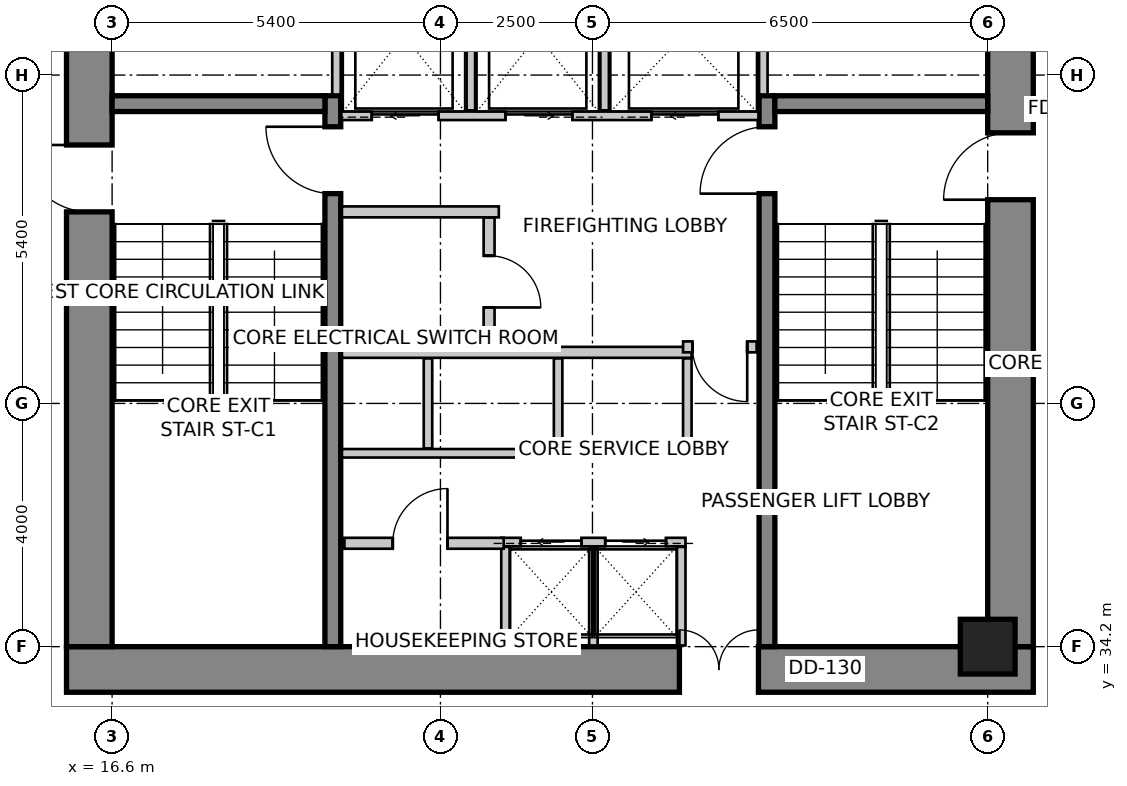
"""IFC4 building model, lengths in metres.
Left out: names, types, materials, properties, quantities, classifications, styles, units other than length and angle.
Written with IfcOpenShell. Run it as: python <this file> out.ifc"""

import sys

from ifc_helpers import new_model, si_unit, direction, frame, frame_2d, origin, origin_2d, place, context, subcontext, project, spatial, rectangle, extrude, source, transform, mapped, element, fill, save


model = new_model("IFC4")
c1 = context("Model", 3, precision=1e-05, world=origin(), true_north=direction((0.0, 1.0)))
c2 = subcontext(c1, "Body", "Model", "MODEL_VIEW")
j1 = project(units=[si_unit("LENGTHUNIT", "METRE"), si_unit("PLANEANGLEUNIT", "RADIAN")], contexts=[c1])
p1 = place(None, origin())
s1 = spatial("IfcSite", under=j1, at=p1, CompositionType="ELEMENT")
p2 = place(p1, origin())
s2 = spatial("IfcBuilding", under=s1, at=p2, CompositionType="ELEMENT")
p3 = place(p2, frame((0.0, 0.0, 117.8)))
s3 = spatial("IfcBuildingStorey", under=s2, at=p3, CompositionType="ELEMENT", Elevation=117.8)
p4 = place(p3, frame((15.85, 33.825, 0.0), z_axis=(0.0, 0.0, 1.0), x_axis=(1.0, 0.0, 0.0)))
e1 = element("IfcWall", 1, at=p4, inside=s3, PredefinedType="SHEAR", context=c2, shape_type="SweptSolid", body=[
    extrude(rectangle(XDim=15.9, YDim=0.75, at=frame_2d((7.95, 0.0))), origin(), (0.0, 0.0, 1.0), 3.6),
])
m1 = source(origin(), c2, "Body", "SweptSolid", [
    extrude(rectangle(XDim=1.3, YDim=2.15, at=frame_2d((0.65, 1.075))), frame((0.0, 0.385, 0.0), z_axis=(0.0, -1.0, 0.0), x_axis=(1.0, 0.0, 0.0)), (0.0, 0.0, 1.0), 0.77),
])
p5 = place(p4, frame((10.08, 0.0, 0.0)))
e2 = element("IfcOpeningElement", 2, at=p5, cuts=e1, PredefinedType="OPENING", context=c2, shape_type="MappedRepresentation", body=[
    mapped(m1, transform((0.0, 0.0, 0.0), scale=1.0)),
])
p6 = place(p3, frame((16.225, 34.2, 0.0), z_axis=(0.0, 0.0, 1.0), x_axis=(0.0, 1.0, 0.0)))
e3 = element("IfcWall", 3, at=p6, inside=s3, PredefinedType="SHEAR", context=c2, shape_type="SweptSolid", body=[
    extrude(rectangle(XDim=11.4, YDim=0.75, at=frame_2d((5.7, 0.0))), origin(), (0.0, 0.0, 1.0), 3.6),
])
m2 = source(origin(), c2, "Body", "SweptSolid", [
    extrude(rectangle(XDim=1.1, YDim=2.15, at=frame_2d((0.55, 1.075))), frame((0.0, 0.385, 0.0), z_axis=(0.0, -1.0, 0.0), x_axis=(1.0, 0.0, 0.0)), (0.0, 0.0, 1.0), 0.77),
])
p7 = place(p6, frame((7.15, 0.0, 0.0)))
e4 = element("IfcOpeningElement", 4, at=p7, cuts=e3, PredefinedType="OPENING", context=c2, shape_type="MappedRepresentation", body=[
    mapped(m2, transform((0.0, 0.0, 0.0), scale=1.0)),
])
p8 = place(p3, frame((31.375, 34.2, 0.0), z_axis=(0.0, 0.0, 1.0), x_axis=(0.0, 1.0, 0.0)))
e5 = element("IfcWall", 5, at=p8, inside=s3, PredefinedType="SHEAR", context=c2, shape_type="SweptSolid", body=[
    extrude(rectangle(XDim=11.4, YDim=0.75, at=frame_2d((5.7, 0.0))), origin(), (0.0, 0.0, 1.0), 3.6),
])
p9 = place(p8, frame((7.35, 0.0, 0.0)))
e6 = element("IfcOpeningElement", 6, at=p9, cuts=e5, PredefinedType="OPENING", context=c2, shape_type="MappedRepresentation", body=[
    mapped(m2, transform((0.0, 0.0, 0.0), scale=1.0)),
])
p10 = place(p3, frame((20.23, 34.2, 0.0), z_axis=(0.0, 0.0, 1.0), x_axis=(0.0, 1.0, 0.0)))
e7 = element("IfcWall", 7, at=p10, inside=s3, PredefinedType="SHEAR", context=c2, shape_type="SweptSolid", body=[
    extrude(rectangle(XDim=9.06, YDim=0.26, at=frame_2d((4.53, 0.0))), origin(), (0.0, 0.0, 1.0), 3.6),
])
m3 = source(origin(), c2, "Body", "SweptSolid", [
    extrude(rectangle(XDim=1.1, YDim=2.15, at=frame_2d((0.55, 1.075))), frame((0.0, 0.14, 0.0), z_axis=(0.0, -1.0, 0.0), x_axis=(1.0, 0.0, 0.0)), (0.0, 0.0, 1.0), 0.28),
])
p11 = place(p10, frame((7.45, 0.0, 0.0)))
e8 = element("IfcOpeningElement", 8, at=p11, cuts=e7, PredefinedType="OPENING", context=c2, shape_type="MappedRepresentation", body=[
    mapped(m3, transform((0.0, 0.0, 0.0), scale=1.0)),
])
p12 = place(p3, frame((27.37, 34.2, 0.0), z_axis=(0.0, 0.0, 1.0), x_axis=(0.0, 1.0, 0.0)))
e9 = element("IfcWall", 9, at=p12, inside=s3, PredefinedType="SHEAR", context=c2, shape_type="SweptSolid", body=[
    extrude(rectangle(XDim=9.06, YDim=0.26, at=frame_2d((4.53, 0.0))), origin(), (0.0, 0.0, 1.0), 3.6),
])
p13 = place(p12, frame((7.45, 0.0, 0.0)))
e10 = element("IfcOpeningElement", 10, at=p13, cuts=e9, PredefinedType="OPENING", context=c2, shape_type="MappedRepresentation", body=[
    mapped(m3, transform((0.0, 0.0, 0.0), scale=1.0)),
])
for number, where, z_axis, x_axis in (
    (11, (16.6, 43.13, 0.0), (0.0, 0.0, 1.0), (1.0, 0.0, 0.0)),
    (12, (27.5, 43.13, 0.0), (0.0, 0.0, 1.0), (1.0, 0.0, 0.0)),
):
    element("IfcWall", number, at=place(p3, frame(where, z_axis=z_axis, x_axis=x_axis)), inside=s3, PredefinedType="SHEAR", context=c2, shape_type="SweptSolid", body=[
        extrude(rectangle(XDim=3.5, YDim=0.26, at=frame_2d((1.75, 0.0))), origin(), (0.0, 0.0, 1.0), 3.6),
    ])
m4 = source(origin(), c2, "Body", "SweptSolid", [
    extrude(rectangle(XDim=0.9, YDim=0.9, at=origin_2d()), origin(), (0.0, 0.0, 1.0), 3.6),
])
p14 = place(p3, frame((31.0, 34.2, 0.0), z_axis=(0.0, 0.0, 1.0), x_axis=(1.0, 0.0, 0.0)))
e13 = element("IfcColumn", 13, at=p14, inside=s3, PredefinedType="COLUMN", context=c2, shape_type="MappedRepresentation", body=[
    mapped(m4, transform((0.0, 0.0, 0.0), scale=1.0)),
])
p15 = place(p3, frame((20.37, 42.93, 0.0), z_axis=(0.0, 0.0, 1.0), x_axis=(1.0, 0.0, 0.0)))
e14 = element("IfcWall", 14, at=p15, inside=s3, PredefinedType="SOLIDWALL", context=c2, shape_type="SweptSolid", body=[
    extrude(rectangle(XDim=6.86, YDim=0.14, at=frame_2d((3.43, 0.0))), origin(), (0.0, 0.0, 1.0), 3.35),
])
m5 = source(origin(), c2, "Body", "SweptSolid", [
    extrude(rectangle(XDim=1.1, YDim=2.15, at=frame_2d((0.55, 1.075))), frame((0.0, 0.08, 0.0), z_axis=(0.0, -1.0, 0.0), x_axis=(1.0, 0.0, 0.0)), (0.0, 0.0, 1.0), 0.16),
])
p16 = place(p15, frame((0.5, 0.0, 0.0)))
e15 = element("IfcOpeningElement", 15, at=p16, cuts=e14, PredefinedType="OPENING", context=c2, shape_type="MappedRepresentation", body=[
    mapped(m5, transform((0.0, 0.0, 0.0), scale=1.0)),
])
p17 = place(p15, frame((2.7, 0.0, 0.0)))
e16 = element("IfcOpeningElement", 16, at=p17, cuts=e14, PredefinedType="OPENING", context=c2, shape_type="MappedRepresentation", body=[
    mapped(m5, transform((0.0, 0.0, 0.0), scale=1.0)),
])
p18 = place(p15, frame((5.1, 0.0, 0.0)))
e17 = element("IfcOpeningElement", 17, at=p18, cuts=e14, PredefinedType="OPENING", context=c2, shape_type="MappedRepresentation", body=[
    mapped(m5, transform((0.0, 0.0, 0.0), scale=1.0)),
])
for number, where, z_axis, x_axis in (
    (18, (20.29, 43.28, 0.0), (0.0, 0.0, 1.0), (0.0, 1.0, 0.0)),
    (19, (27.31, 43.28, 0.0), (0.0, 0.0, 1.0), (0.0, 1.0, 0.0)),
):
    element("IfcWall", number, at=place(p3, frame(where, z_axis=z_axis, x_axis=x_axis)), inside=s3, PredefinedType="SOLIDWALL", context=c2, shape_type="SweptSolid", body=[
        extrude(rectangle(XDim=2.3, YDim=0.14, at=frame_2d((1.15, 0.0))), origin(), (0.0, 0.0, 1.0), 3.35),
    ])
for number, where, z_axis, x_axis in (
    (20, (22.5, 43.02, 0.0), (0.0, 0.0, 1.0), (0.0, 1.0, 0.0)),
    (21, (24.7, 43.02, 0.0), (0.0, 0.0, 1.0), (0.0, 1.0, 0.0)),
):
    element("IfcWall", number, at=place(p3, frame(where, z_axis=z_axis, x_axis=x_axis)), inside=s3, PredefinedType="SOLIDWALL", context=c2, shape_type="SweptSolid", body=[
        extrude(rectangle(XDim=2.56, YDim=0.14, at=frame_2d((1.28, 0.0))), origin(), (0.0, 0.0, 1.0), 3.35),
    ])
p19 = place(p3, frame((23.0, 35.92, 0.0), z_axis=(0.0, 0.0, 1.0), x_axis=(1.0, 0.0, 0.0)))
e22 = element("IfcWall", 22, at=p19, inside=s3, PredefinedType="SOLIDWALL", context=c2, shape_type="SweptSolid", body=[
    extrude(rectangle(XDim=3.03, YDim=0.14, at=frame_2d((1.515, 0.0))), origin(), (0.0, 0.0, 1.0), 3.35),
])
m6 = source(origin(), c2, "Body", "SweptSolid", [
    extrude(rectangle(XDim=1.0, YDim=2.15, at=frame_2d((0.5, 1.075))), frame((0.0, 0.08, 0.0), z_axis=(0.0, -1.0, 0.0), x_axis=(1.0, 0.0, 0.0)), (0.0, 0.0, 1.0), 0.16),
])
p20 = place(p19, frame((0.32, 0.0, 0.0)))
e23 = element("IfcOpeningElement", 23, at=p20, cuts=e22, PredefinedType="OPENING", context=c2, shape_type="MappedRepresentation", body=[
    mapped(m6, transform((0.0, 0.0, 0.0), scale=1.0)),
])
p21 = place(p19, frame((1.71, 0.0, 0.0)))
e24 = element("IfcOpeningElement", 24, at=p21, cuts=e22, PredefinedType="OPENING", context=c2, shape_type="MappedRepresentation", body=[
    mapped(m6, transform((0.0, 0.0, 0.0), scale=1.0)),
])
for number, where, z_axis, x_axis in (
    (25, (25.96, 34.22, 0.0), (0.0, 0.0, 1.0), (0.0, 1.0, 0.0)),
    (26, (23.07, 34.22, 0.0), (0.0, 0.0, 1.0), (0.0, 1.0, 0.0)),
    (27, (24.515, 34.22, 0.0), (0.0, 0.0, 1.0), (0.0, 1.0, 0.0)),
):
    element("IfcWall", number, at=place(p3, frame(where, z_axis=z_axis, x_axis=x_axis)), inside=s3, PredefinedType="SOLIDWALL", context=c2, shape_type="SweptSolid", body=[
        extrude(rectangle(XDim=1.62, YDim=0.14, at=frame_2d((0.81, 0.0))), origin(), (0.0, 0.0, 1.0), 2.642),
    ])
p22 = place(p3, frame((20.38, 37.38, 0.0), z_axis=(0.0, 0.0, 1.0), x_axis=(1.0, 0.0, 0.0)))
e28 = element("IfcWall", 28, at=p22, inside=s3, PredefinedType="SOLIDWALL", context=c2, shape_type="SweptSolid", body=[
    extrude(rectangle(XDim=5.75, YDim=0.14, at=frame_2d((2.875, 0.0))), origin(), (0.0, 0.0, 1.0), 3.35),
])
p23 = place(p3, frame((20.38, 39.04, 0.0), z_axis=(0.0, 0.0, 1.0), x_axis=(1.0, 0.0, 0.0)))
e29 = element("IfcWall", 29, at=p23, inside=s3, PredefinedType="SOLIDWALL", context=c2, shape_type="SweptSolid", body=[
    extrude(rectangle(XDim=5.75, YDim=0.18, at=frame_2d((2.875, 0.0))), origin(), (0.0, 0.0, 1.0), 3.35),
])
for number, where, z_axis, x_axis in (
    (30, (26.06, 37.46, 0.0), (0.0, 0.0, 1.0), (0.0, 1.0, 0.0)),
    (31, (21.795, 37.46, 0.0), (0.0, 0.0, 1.0), (0.0, 1.0, 0.0)),
    (32, (23.935, 37.46, 0.0), (0.0, 0.0, 1.0), (0.0, 1.0, 0.0)),
):
    element("IfcWall", number, at=place(p3, frame(where, z_axis=z_axis, x_axis=x_axis)), inside=s3, PredefinedType="SOLIDWALL", context=c2, shape_type="SweptSolid", body=[
        extrude(rectangle(XDim=1.48, YDim=0.14, at=frame_2d((0.74, 0.0))), origin(), (0.0, 0.0, 1.0), 3.35),
    ])
p24 = place(p3, frame((22.96, 41.35, 0.0), z_axis=(0.0, 0.0, 1.0), x_axis=(-1.0, 0.0, 0.0)))
e33 = element("IfcWall", 33, at=p24, inside=s3, PredefinedType="PARTITIONING", context=c2, shape_type="SweptSolid", body=[
    extrude(rectangle(XDim=2.58, YDim=0.18, at=frame_2d((1.29, 0.0))), origin(), (0.0, 0.0, 1.0), 3.35),
])
p25 = place(p3, frame((22.8, 41.256, 0.0), z_axis=(0.0, 0.0, 1.0), x_axis=(0.0, -1.0, 0.0)))
e34 = element("IfcWall", 34, at=p25, inside=s3, PredefinedType="PARTITIONING", context=c2, shape_type="SweptSolid", body=[
    extrude(rectangle(XDim=2.106, YDim=0.18, at=frame_2d((1.053, 0.0))), origin(), (0.0, 0.0, 1.0), 3.35),
])
m7 = source(origin(), c2, "Body", "SweptSolid", [
    extrude(rectangle(XDim=0.85, YDim=2.15, at=frame_2d((0.425, 1.075))), frame((0.0, 0.1, 0.0), z_axis=(0.0, -1.0, 0.0), x_axis=(1.0, 0.0, 0.0)), (0.0, 0.0, 1.0), 0.2),
])
p26 = place(p25, frame((0.628, 0.0, 0.0)))
e35 = element("IfcOpeningElement", 35, at=p26, cuts=e34, PredefinedType="OPENING", context=c2, shape_type="MappedRepresentation", body=[
    mapped(m7, transform((0.0, 0.0, 0.0), scale=1.0)),
])
p27 = place(p3, frame((27.2, 39.13, 0.0), z_axis=(0.0, 0.0, 1.0), x_axis=(-1.0, 0.0, 0.0)))
e36 = element("IfcWall", 36, at=p27, inside=s3, PredefinedType="PARTITIONING", context=c2, shape_type="SweptSolid", body=[
    extrude(rectangle(XDim=1.21, YDim=0.18, at=frame_2d((0.605, 0.0))), origin(), (0.0, 0.0, 1.0), 3.35),
])
m8 = source(origin(), c2, "Body", "SweptSolid", [
    extrude(rectangle(XDim=0.9, YDim=2.15, at=frame_2d((0.45, 1.075))), frame((0.0, 0.1, 0.0), z_axis=(0.0, -1.0, 0.0), x_axis=(1.0, 0.0, 0.0)), (0.0, 0.0, 1.0), 0.2),
])
p28 = place(p27, frame((0.155, 0.0, 0.0)))
e37 = element("IfcOpeningElement", 37, at=p28, cuts=e36, PredefinedType="OPENING", context=c2, shape_type="MappedRepresentation", body=[
    mapped(m8, transform((0.0, 0.0, 0.0), scale=1.0)),
])
p29 = place(p3, frame((20.42, 35.9, 0.0), z_axis=(0.0, 0.0, 1.0), x_axis=(1.0, 0.0, 0.0)))
e38 = element("IfcWall", 38, at=p29, inside=s3, PredefinedType="PARTITIONING", context=c2, shape_type="SweptSolid", body=[
    extrude(rectangle(XDim=2.62, YDim=0.18, at=frame_2d((1.31, 0.0))), origin(), (0.0, 0.0, 1.0), 3.35),
])
p30 = place(p29, frame((0.796, 0.0, 0.0)))
e39 = element("IfcOpeningElement", 39, at=p30, cuts=e38, PredefinedType="OPENING", context=c2, shape_type="MappedRepresentation", body=[
    mapped(m8, transform((0.0, 0.0, 0.0), scale=1.0)),
])
m9 = source(origin(), c2, "Body", "SweptSolid", [
    extrude(rectangle(XDim=1.1, YDim=2.15, at=frame_2d((0.55, 1.075))), frame((0.0, 0.025, 0.0), z_axis=(0.0, -1.0, 0.0), x_axis=(1.0, 0.0, 0.0)), (0.0, 0.0, 1.0), 0.05),
])
p31 = place(p16, origin())
e40 = element("IfcDoor", 40, at=p31, inside=s3, OperationType="SLIDING_TO_LEFT", PredefinedType="DOOR", context=c2, shape_type="MappedRepresentation", body=[
    mapped(m9, transform((0.0, 0.0, 0.0), scale=1.0)),
])
fill(e15, e40)
p32 = place(p17, origin())
e41 = element("IfcDoor", 41, at=p32, inside=s3, OperationType="SLIDING_TO_RIGHT", PredefinedType="DOOR", context=c2, shape_type="MappedRepresentation", body=[
    mapped(m9, transform((0.0, 0.0, 0.0), scale=1.0)),
])
fill(e16, e41)
m10 = source(origin(), c2, "Body", "SweptSolid", [
    extrude(rectangle(XDim=1.1, YDim=2.15, at=frame_2d((0.55, 1.075))), frame((0.0, 0.025, 0.0), z_axis=(0.0, -1.0, 0.0), x_axis=(1.0, 0.0, 0.0)), (0.0, 0.0, 1.0), 0.05),
])
p33 = place(p18, origin())
e42 = element("IfcDoor", 42, at=p33, inside=s3, OperationType="SLIDING_TO_LEFT", PredefinedType="DOOR", context=c2, shape_type="MappedRepresentation", body=[
    mapped(m10, transform((0.0, 0.0, 0.0), scale=1.0)),
])
fill(e17, e42)
m11 = source(origin(), c2, "Body", "SweptSolid", [
    extrude(rectangle(XDim=1.0, YDim=2.15, at=frame_2d((0.5, 1.075))), frame((0.0, 0.025, 0.0), z_axis=(0.0, -1.0, 0.0), x_axis=(1.0, 0.0, 0.0)), (0.0, 0.0, 1.0), 0.05),
])
p34 = place(p20, origin())
e43 = element("IfcDoor", 43, at=p34, inside=s3, OperationType="SLIDING_TO_LEFT", PredefinedType="DOOR", context=c2, shape_type="MappedRepresentation", body=[
    mapped(m11, transform((0.0, 0.0, 0.0), scale=1.0)),
])
fill(e23, e43)
p35 = place(p21, origin())
e44 = element("IfcDoor", 44, at=p35, inside=s3, OperationType="SLIDING_TO_RIGHT", PredefinedType="DOOR", context=c2, shape_type="MappedRepresentation", body=[
    mapped(m11, transform((0.0, 0.0, 0.0), scale=1.0)),
])
fill(e24, e44)
m12 = source(origin(), c2, "Body", "SweptSolid", [
    extrude(rectangle(XDim=1.1, YDim=2.15, at=frame_2d((0.55, 1.075))), frame((0.0, 0.025, 0.0), z_axis=(0.0, -1.0, 0.0), x_axis=(1.0, 0.0, 0.0)), (0.0, 0.0, 1.0), 0.05),
])
p36 = place(p11, origin())
e45 = element("IfcDoor", 45, at=p36, inside=s3, OperationType="SINGLE_SWING_RIGHT", PredefinedType="DOOR", context=c2, shape_type="MappedRepresentation", body=[
    mapped(m12, transform((0.0, 0.0, 0.0), scale=1.0)),
])
fill(e8, e45)
p37 = place(p13, origin())
e46 = element("IfcDoor", 46, at=p37, inside=s3, OperationType="SINGLE_SWING_LEFT", PredefinedType="DOOR", context=c2, shape_type="MappedRepresentation", body=[
    mapped(m12, transform((0.0, 0.0, 0.0), scale=1.0)),
])
fill(e10, e46)
p38 = place(p7, origin())
e47 = element("IfcDoor", 47, at=p38, inside=s3, OperationType="SINGLE_SWING_RIGHT", PredefinedType="DOOR", context=c2, shape_type="MappedRepresentation", body=[
    mapped(m12, transform((0.0, 0.0, 0.0), scale=1.0)),
])
fill(e4, e47)
p39 = place(p9, origin())
e48 = element("IfcDoor", 48, at=p39, inside=s3, OperationType="SINGLE_SWING_LEFT", PredefinedType="DOOR", context=c2, shape_type="MappedRepresentation", body=[
    mapped(m12, transform((0.0, 0.0, 0.0), scale=1.0)),
])
fill(e6, e48)
m13 = source(origin(), c2, "Body", "SweptSolid", [
    extrude(rectangle(XDim=1.3, YDim=2.15, at=frame_2d((0.65, 1.075))), frame((0.0, 0.025, 0.0), z_axis=(0.0, -1.0, 0.0), x_axis=(1.0, 0.0, 0.0)), (0.0, 0.0, 1.0), 0.05),
])
p40 = place(p5, origin())
e49 = element("IfcDoor", 49, at=p40, inside=s3, OperationType="DOUBLE_DOOR_SINGLE_SWING", PredefinedType="DOOR", context=c2, shape_type="MappedRepresentation", body=[
    mapped(m13, transform((0.0, 0.0, 0.0), scale=1.0)),
])
fill(e2, e49)
m14 = source(origin(), c2, "Body", "SweptSolid", [
    extrude(rectangle(XDim=0.85, YDim=2.15, at=frame_2d((0.425, 1.075))), frame((0.0, 0.025, 0.0), z_axis=(0.0, -1.0, 0.0), x_axis=(1.0, 0.0, 0.0)), (0.0, 0.0, 1.0), 0.05),
])
p41 = place(p26, origin())
e50 = element("IfcDoor", 50, at=p41, inside=s3, OperationType="SINGLE_SWING_RIGHT", PredefinedType="DOOR", context=c2, shape_type="MappedRepresentation", body=[
    mapped(m14, transform((0.0, 0.0, 0.0), scale=1.0)),
])
fill(e35, e50)
m15 = source(origin(), c2, "Body", "SweptSolid", [
    extrude(rectangle(XDim=0.9, YDim=2.15, at=frame_2d((0.45, 1.075))), frame((0.0, 0.025, 0.0), z_axis=(0.0, -1.0, 0.0), x_axis=(1.0, 0.0, 0.0)), (0.0, 0.0, 1.0), 0.05),
])
p42 = place(p28, origin())
e51 = element("IfcDoor", 51, at=p42, inside=s3, OperationType="SINGLE_SWING_LEFT", PredefinedType="DOOR", context=c2, shape_type="MappedRepresentation", body=[
    mapped(m15, transform((0.0, 0.0, 0.0), scale=1.0)),
])
fill(e37, e51)
p43 = place(p30, origin())
e52 = element("IfcDoor", 52, at=p43, inside=s3, OperationType="SINGLE_SWING_RIGHT", PredefinedType="DOOR", context=c2, shape_type="MappedRepresentation", body=[
    mapped(m15, transform((0.0, 0.0, 0.0), scale=1.0)),
])
fill(e39, e52)
save(model, sys.argv[1])
